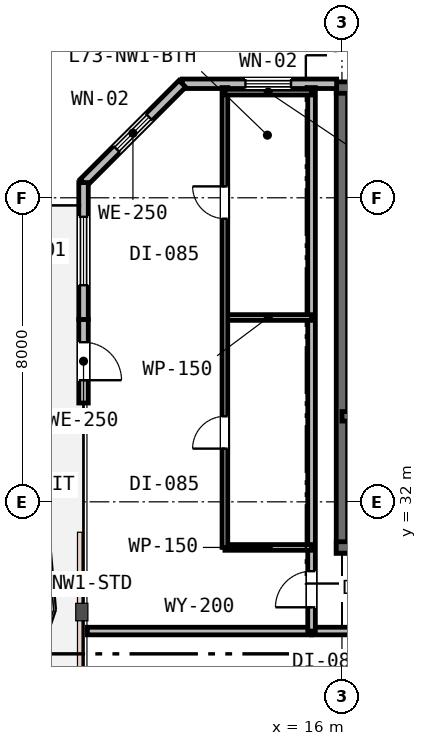
"""IFC4 building model, lengths in metres.
Left out: names, types, materials, properties, quantities, classifications, styles, units other than length and angle.
Written with IfcOpenShell. Run it as: python <this file> out.ifc"""

import sys

from ifc_helpers import new_model, si_unit, direction, frame, frame_2d, origin, place, context, subcontext, project, spatial, rectangle, extrude, element, fill, save


model = new_model("IFC4")
c1 = context("Model", 3, precision=1e-05, world=origin(), true_north=direction((0.0, 1.0)))
c2 = subcontext(c1, "Body", "Model", "MODEL_VIEW")
j1 = project(units=[si_unit("LENGTHUNIT", "METRE"), si_unit("PLANEANGLEUNIT", "RADIAN")], contexts=[c1])
p1 = place(None, origin())
s1 = spatial("IfcSite", under=j1, at=p1, CompositionType="ELEMENT")
p2 = place(p1, origin())
s2 = spatial("IfcBuilding", under=s1, at=p2, CompositionType="ELEMENT")
p3 = place(p2, frame((0.0, 0.0, 283.0)))
s3 = spatial("IfcBuildingStorey", under=s2, at=p3, CompositionType="ELEMENT", Elevation=283.0)
p4 = place(p3, frame((16.0, 30.65, 0.0), z_axis=(0.0, 0.0, 1.0), x_axis=(0.0, 1.0, 0.0)))
e1 = element("IfcWall", 1, at=p4, inside=s3, PredefinedType="SHEAR", context=c2, shape_type="SweptSolid", body=[
    extrude(rectangle(XDim=12.3, YDim=0.3, at=frame_2d((6.15, 0.0))), origin(), (0.0, 0.0, 1.0), 3.8),
])
p5 = place(p3, frame((15.85, 42.9, 0.0), z_axis=(0.0, 0.0, 1.0), x_axis=(1.0, 0.0, 0.0)))
e2 = element("IfcWall", 2, at=p5, inside=s3, PredefinedType="SHEAR", context=c2, shape_type="SweptSolid", body=[
    extrude(rectangle(XDim=24.3, YDim=0.3, at=frame_2d((12.15, 0.0))), origin(), (0.0, 0.0, 1.0), 3.8),
])
p6 = place(p5, frame((1.6, 0.0, 0.95)))
e3 = element("IfcOpeningElement", 3, at=p6, cuts=e2, PredefinedType="OPENING", context=c2, shape_type="SweptSolid", body=[
    extrude(rectangle(XDim=1.2, YDim=1.6, at=frame_2d((0.6, 0.8))), frame((0.0, 0.16, 0.0), z_axis=(0.0, -1.0, 0.0), x_axis=(1.0, 0.0, 0.0)), (0.0, 0.0, 1.0), 0.32),
])
p7 = place(p5, frame((16.5, 0.0, 0.95)))
e4 = element("IfcOpeningElement", 4, at=p7, cuts=e2, PredefinedType="OPENING", context=c2, shape_type="SweptSolid", body=[
    extrude(rectangle(XDim=1.2, YDim=1.6, at=frame_2d((0.6, 0.8))), frame((0.0, 0.16, 0.0), z_axis=(0.0, -1.0, 0.0), x_axis=(1.0, 0.0, 0.0)), (0.0, 0.0, 1.0), 0.32),
])
p8 = place(p5, frame((21.6, 0.0, 0.95)))
e5 = element("IfcOpeningElement", 5, at=p8, cuts=e2, PredefinedType="OPENING", context=c2, shape_type="SweptSolid", body=[
    extrude(rectangle(XDim=1.2, YDim=1.6, at=frame_2d((0.6, 0.8))), frame((0.0, 0.16, 0.0), z_axis=(0.0, -1.0, 0.0), x_axis=(1.0, 0.0, 0.0)), (0.0, 0.0, 1.0), 0.32),
])
p9 = place(p3, frame((15.85, 30.8, 0.0), z_axis=(0.0, 0.0, 1.0), x_axis=(1.0, 0.0, 0.0)))
e6 = element("IfcWall", 6, at=p9, inside=s3, PredefinedType="SHEAR", context=c2, shape_type="SweptSolid", body=[
    extrude(rectangle(XDim=11.2, YDim=0.3, at=frame_2d((5.6, 0.0))), origin(), (0.0, 0.0, 1.0), 3.8),
])
p10 = place(p9, frame((2.45, 0.0, 0.0)))
e7 = element("IfcOpeningElement", 7, at=p10, cuts=e6, PredefinedType="OPENING", context=c2, shape_type="SweptSolid", body=[
    extrude(rectangle(XDim=1.1, YDim=2.15, at=frame_2d((0.55, 1.075))), frame((0.0, 0.16, 0.0), z_axis=(0.0, -1.0, 0.0), x_axis=(1.0, 0.0, 0.0)), (0.0, 0.0, 1.0), 0.32),
])
p11 = place(p3, frame((16.0, 34.25, 0.0), z_axis=(0.0, 0.0, 1.0), x_axis=(1.0, 0.0, 0.0)))
e8 = element("IfcWall", 8, at=p11, inside=s3, PredefinedType="SHEAR", context=c2, shape_type="SweptSolid", body=[
    extrude(rectangle(XDim=6.05, YDim=0.25, at=frame_2d((3.025, 0.0))), origin(), (0.0, 0.0, 1.0), 3.8),
])
p12 = place(p11, frame((1.25, 0.0, 0.0)))
e9 = element("IfcOpeningElement", 9, at=p12, cuts=e8, PredefinedType="OPENING", context=c2, shape_type="SweptSolid", body=[
    extrude(rectangle(XDim=1.0, YDim=2.15, at=frame_2d((0.5, 1.075))), frame((0.0, 0.135, 0.0), z_axis=(0.0, -1.0, 0.0), x_axis=(1.0, 0.0, 0.0)), (0.0, 0.0, 1.0), 0.27),
])
p13 = place(p11, frame((4.2, 0.0, 0.0)))
e10 = element("IfcOpeningElement", 10, at=p13, cuts=e8, PredefinedType="OPENING", context=c2, shape_type="SweptSolid", body=[
    extrude(rectangle(XDim=1.1, YDim=2.15, at=frame_2d((0.55, 1.075))), frame((0.0, 0.135, 0.0), z_axis=(0.0, -1.0, 0.0), x_axis=(1.0, 0.0, 0.0)), (0.0, 0.0, 1.0), 0.27),
])
p14 = place(p3, frame((15.86, 43.0, 0.0), z_axis=(0.0, 0.0, 1.0), x_axis=(-1.0, 0.0, 0.0)))
e11 = element("IfcWall", 11, at=p14, inside=s3, PredefinedType="STANDARD", context=c2, shape_type="SweptSolid", body=[
    extrude(rectangle(XDim=4.06, YDim=0.25, at=frame_2d((2.03, 0.0))), origin(), (0.0, 0.0, 1.0), 3.53),
])
p15 = place(p14, frame((1.2, 0.0, 0.85)))
e12 = element("IfcOpeningElement", 12, at=p15, cuts=e11, PredefinedType="OPENING", context=c2, shape_type="SweptSolid", body=[
    extrude(rectangle(XDim=1.2, YDim=1.6, at=frame_2d((0.6, 0.8))), frame((0.0, 0.135, 0.0), z_axis=(0.0, -1.0, 0.0), x_axis=(1.0, 0.0, 0.0)), (0.0, 0.0, 1.0), 0.27),
])
p16 = place(p3, frame((11.8, 43.0, 0.0), z_axis=(0.0, 0.0, 1.0), x_axis=(-0.707106781187, -0.707106781187, 0.0)))
e13 = element("IfcWall", 13, at=p16, inside=s3, PredefinedType="STANDARD", context=c2, shape_type="SweptSolid", body=[
    extrude(rectangle(XDim=3.677, YDim=0.25, at=frame_2d((1.839, 0.0))), origin(), (0.0, 0.0, 1.0), 3.53),
])
p17 = place(p16, frame((1.238, 0.0, 0.85)))
e14 = element("IfcOpeningElement", 14, at=p17, cuts=e13, PredefinedType="OPENING", context=c2, shape_type="SweptSolid", body=[
    extrude(rectangle(XDim=1.2, YDim=1.6, at=frame_2d((0.6, 0.8))), frame((0.0, 0.135, 0.0), z_axis=(0.0, -1.0, 0.0), x_axis=(1.0, 0.0, 0.0)), (0.0, 0.0, 1.0), 0.27),
])
p18 = place(p3, frame((9.2, 36.8, 0.0), z_axis=(0.0, 0.0, 1.0), x_axis=(0.0, -1.0, 0.0)))
e15 = element("IfcWall", 15, at=p18, inside=s3, PredefinedType="STANDARD", context=c2, shape_type="SweptSolid", body=[
    extrude(rectangle(XDim=2.2, YDim=0.25, at=frame_2d((1.1, 0.0))), origin(), (0.0, 0.0, 1.0), 3.53),
])
p19 = place(p18, frame((0.6, 0.0, 0.0)))
e16 = element("IfcOpeningElement", 16, at=p19, cuts=e15, PredefinedType="OPENING", context=c2, shape_type="SweptSolid", body=[
    extrude(rectangle(XDim=1.0, YDim=2.15, at=frame_2d((0.5, 1.075))), frame((0.0, 0.135, 0.0), z_axis=(0.0, -1.0, 0.0), x_axis=(1.0, 0.0, 0.0)), (0.0, 0.0, 1.0), 0.27),
])
p20 = place(p3, frame((9.2, 40.4, 0.0), z_axis=(0.0, 0.0, 1.0), x_axis=(0.0, -1.0, 0.0)))
e17 = element("IfcWall", 17, at=p20, inside=s3, PredefinedType="STANDARD", context=c2, shape_type="SweptSolid", body=[
    extrude(rectangle(XDim=3.6, YDim=0.25, at=frame_2d((1.8, 0.0))), origin(), (0.0, 0.0, 1.0), 3.53),
])
p21 = place(p20, frame((0.9, 0.0, 0.75)))
e18 = element("IfcOpeningElement", 18, at=p21, cuts=e17, PredefinedType="OPENING", context=c2, shape_type="SweptSolid", body=[
    extrude(rectangle(XDim=1.8, YDim=1.85, at=frame_2d((0.9, 0.925))), frame((0.0, 0.135, 0.0), z_axis=(0.0, -1.0, 0.0), x_axis=(1.0, 0.0, 0.0)), (0.0, 0.0, 1.0), 0.27),
])
p22 = place(p3, frame((9.3, 28.6, 0.0), z_axis=(0.0, 0.0, 1.0), x_axis=(1.0, 0.0, 0.0)))
e19 = element("IfcWall", 19, at=p22, inside=s3, PredefinedType="PARTITIONING", context=c2, shape_type="SweptSolid", body=[
    extrude(rectangle(XDim=5.9, YDim=0.2, at=frame_2d((2.95, 0.0))), origin(), (0.0, 0.0, 1.0), 3.53),
])
p23 = place(p3, frame((15.2, 28.6, 0.0), z_axis=(0.0, 0.0, 1.0), x_axis=(1.0, 0.0, 0.0)))
e20 = element("IfcWall", 20, at=p23, inside=s3, PredefinedType="PARTITIONING", context=c2, shape_type="SweptSolid", body=[
    extrude(rectangle(XDim=4.6, YDim=0.2, at=frame_2d((2.3, 0.0))), origin(), (0.0, 0.0, 1.0), 3.24),
])
p24 = place(p3, frame((15.2, 28.6, 0.0), z_axis=(0.0, 0.0, 1.0), x_axis=(0.0, 1.0, 0.0)))
e21 = element("IfcWall", 21, at=p24, inside=s3, PredefinedType="PARTITIONING", context=c2, shape_type="SweptSolid", body=[
    extrude(rectangle(XDim=14.3, YDim=0.2, at=frame_2d((7.15, 0.0))), origin(), (0.0, 0.0, 1.0), 3.53),
])
p25 = place(p24, frame((0.625, 0.0, 0.0)))
e22 = element("IfcOpeningElement", 22, at=p25, cuts=e21, PredefinedType="OPENING", context=c2, shape_type="SweptSolid", body=[
    extrude(rectangle(XDim=0.95, YDim=2.15, at=frame_2d((0.475, 1.075))), frame((0.0, 0.11, 0.0), z_axis=(0.0, -1.0, 0.0), x_axis=(1.0, 0.0, 0.0)), (0.0, 0.0, 1.0), 0.22),
])
for number, where, z_axis, x_axis in (
    (23, (12.92, 30.8, 0.0), (0.0, 0.0, 1.0), (1.0, 0.0, 0.0)),
    (24, (12.92, 36.85, 0.0), (0.0, 0.0, 1.0), (1.0, 0.0, 0.0)),
):
    element("IfcWall", number, at=place(p3, frame(where, z_axis=z_axis, x_axis=x_axis)), inside=s3, PredefinedType="PARTITIONING", context=c2, shape_type="SweptSolid", body=[
        extrude(rectangle(XDim=2.28, YDim=0.15, at=frame_2d((1.14, 0.0))), origin(), (0.0, 0.0, 1.0), 3.53),
    ])
p26 = place(p3, frame((12.92, 30.8, 0.0), z_axis=(0.0, 0.0, 1.0), x_axis=(0.0, 1.0, 0.0)))
e25 = element("IfcWall", 25, at=p26, inside=s3, PredefinedType="PARTITIONING", context=c2, shape_type="SweptSolid", body=[
    extrude(rectangle(XDim=12.1, YDim=0.15, at=frame_2d((6.05, 0.0))), origin(), (0.0, 0.0, 1.0), 3.53),
])
p27 = place(p26, frame((2.6, 0.0, 0.0)))
e26 = element("IfcOpeningElement", 26, at=p27, cuts=e25, PredefinedType="OPENING", context=c2, shape_type="SweptSolid", body=[
    extrude(rectangle(XDim=0.85, YDim=2.15, at=frame_2d((0.425, 1.075))), frame((0.0, 0.085, 0.0), z_axis=(0.0, -1.0, 0.0), x_axis=(1.0, 0.0, 0.0)), (0.0, 0.0, 1.0), 0.17),
])
p28 = place(p26, frame((8.65, 0.0, 0.0)))
e27 = element("IfcOpeningElement", 27, at=p28, cuts=e25, PredefinedType="OPENING", context=c2, shape_type="SweptSolid", body=[
    extrude(rectangle(XDim=0.85, YDim=2.15, at=frame_2d((0.425, 1.075))), frame((0.0, 0.085, 0.0), z_axis=(0.0, -1.0, 0.0), x_axis=(1.0, 0.0, 0.0)), (0.0, 0.0, 1.0), 0.17),
])
p29 = place(p3, frame((12.92, 42.78, 0.0), z_axis=(0.0, 0.0, 1.0), x_axis=(1.0, 0.0, 0.0)))
e28 = element("IfcWall", 28, at=p29, inside=s3, PredefinedType="PARTITIONING", context=c2, shape_type="SweptSolid", body=[
    extrude(rectangle(XDim=2.28, YDim=0.15, at=frame_2d((1.14, 0.0))), origin(), (0.0, 0.0, 1.0), 3.53),
])
p30 = place(p15, origin())
e29 = element("IfcWindow", 29, at=p30, inside=s3, PartitioningType="SINGLE_PANEL", PredefinedType="WINDOW", context=c2, shape_type="SweptSolid", body=[
    extrude(rectangle(XDim=1.2, YDim=1.6, at=frame_2d((0.6, 0.8))), frame((0.0, 0.03, 0.0), z_axis=(0.0, -1.0, 0.0), x_axis=(1.0, 0.0, 0.0)), (0.0, 0.0, 1.0), 0.06),
])
fill(e12, e29)
p31 = place(p17, origin())
e30 = element("IfcWindow", 30, at=p31, inside=s3, PartitioningType="SINGLE_PANEL", PredefinedType="WINDOW", context=c2, shape_type="SweptSolid", body=[
    extrude(rectangle(XDim=1.2, YDim=1.6, at=frame_2d((0.6, 0.8))), frame((0.0, 0.03, 0.0), z_axis=(0.0, -1.0, 0.0), x_axis=(1.0, 0.0, 0.0)), (0.0, 0.0, 1.0), 0.06),
])
fill(e14, e30)
p32 = place(p19, origin())
e31 = element("IfcDoor", 31, at=p32, inside=s3, OperationType="SINGLE_SWING_RIGHT", PredefinedType="DOOR", context=c2, shape_type="SweptSolid", body=[
    extrude(rectangle(XDim=1.0, YDim=2.15, at=frame_2d((0.5, 1.075))), frame((0.0, 0.025, 0.0), z_axis=(0.0, -1.0, 0.0), x_axis=(1.0, 0.0, 0.0)), (0.0, 0.0, 1.0), 0.05),
])
fill(e16, e31)
p33 = place(p21, origin())
e32 = element("IfcWindow", 32, at=p33, inside=s3, PartitioningType="SINGLE_PANEL", PredefinedType="WINDOW", context=c2, shape_type="SweptSolid", body=[
    extrude(rectangle(XDim=1.8, YDim=1.85, at=frame_2d((0.9, 0.925))), frame((0.0, 0.03, 0.0), z_axis=(0.0, -1.0, 0.0), x_axis=(1.0, 0.0, 0.0)), (0.0, 0.0, 1.0), 0.06),
])
fill(e18, e32)
p34 = place(p25, origin())
e33 = element("IfcDoor", 33, at=p34, inside=s3, OperationType="SINGLE_SWING_LEFT", PredefinedType="DOOR", context=c2, shape_type="SweptSolid", body=[
    extrude(rectangle(XDim=0.95, YDim=2.15, at=frame_2d((0.475, 1.075))), frame((0.0, 0.025, 0.0), z_axis=(0.0, -1.0, 0.0), x_axis=(1.0, 0.0, 0.0)), (0.0, 0.0, 1.0), 0.05),
])
fill(e22, e33)
p35 = place(p27, origin())
e34 = element("IfcDoor", 34, at=p35, inside=s3, OperationType="SINGLE_SWING_LEFT", PredefinedType="DOOR", context=c2, shape_type="SweptSolid", body=[
    extrude(rectangle(XDim=0.85, YDim=2.15, at=frame_2d((0.425, 1.075))), frame((0.0, 0.025, 0.0), z_axis=(0.0, -1.0, 0.0), x_axis=(1.0, 0.0, 0.0)), (0.0, 0.0, 1.0), 0.05),
])
fill(e26, e34)
p36 = place(p28, origin())
e35 = element("IfcDoor", 35, at=p36, inside=s3, OperationType="SINGLE_SWING_RIGHT", PredefinedType="DOOR", context=c2, shape_type="SweptSolid", body=[
    extrude(rectangle(XDim=0.85, YDim=2.15, at=frame_2d((0.425, 1.075))), frame((0.0, 0.025, 0.0), z_axis=(0.0, -1.0, 0.0), x_axis=(1.0, 0.0, 0.0)), (0.0, 0.0, 1.0), 0.05),
])
fill(e27, e35)
save(model, sys.argv[1])
